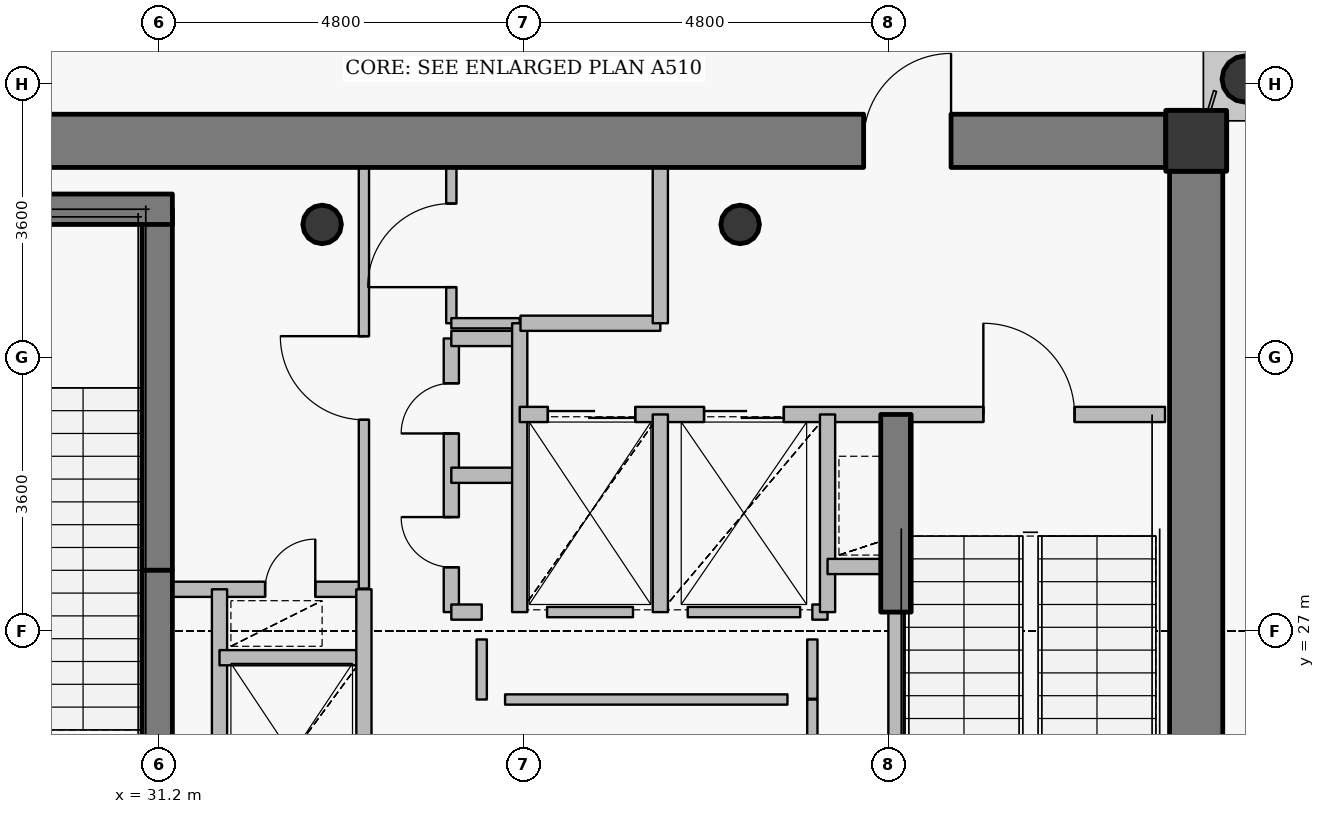
"""IFC4 building model, lengths in metres.
Left out: names, types, materials, properties, quantities, classifications, styles, units other than length and angle.
Written with IfcOpenShell. Run it as: python <this file> out.ifc"""

import sys

from ifc_helpers import new_model, si_unit, direction, frame, frame_2d, origin, origin_2d, place, context, subcontext, project, spatial, rectangle, hollow_circle, extrude, source, transform, mapped, element, fill, save


model = new_model("IFC4")
c1 = context("Model", 3, precision=1e-05, world=origin(), true_north=direction((0.0, 1.0)))
c2 = subcontext(c1, "Body", "Model", "MODEL_VIEW")
j1 = project(units=[si_unit("LENGTHUNIT", "METRE"), si_unit("PLANEANGLEUNIT", "RADIAN")], contexts=[c1])
p1 = place(None, origin())
s1 = spatial("IfcSite", under=j1, at=p1, CompositionType="ELEMENT")
p2 = place(p1, origin())
s2 = spatial("IfcBuilding", under=s1, at=p2, CompositionType="ELEMENT")
p3 = place(p2, frame((0.0, 0.0, 368.4)))
s3 = spatial("IfcBuildingStorey", under=s2, at=p3, CompositionType="ELEMENT", Elevation=368.4)
p4 = place(p3, frame((44.85, 33.45, 0.0), z_axis=(0.0, 0.0, 1.0), x_axis=(1.0, 0.0, 0.0)))
e1 = element("IfcColumn", 1, at=p4, inside=s3, PredefinedType="COLUMN", context=c2, shape_type="SweptSolid", body=[
    extrude(rectangle(XDim=0.8, YDim=0.8, at=origin_2d()), origin(), (0.0, 0.0, 1.0), 4.8),
])
for number, where, z_axis, x_axis in (
    (2, (38.85, 32.35, 0.0), (0.0, 0.0, 1.0), (1.0, 0.0, 0.0)),
    (3, (33.35, 32.35, 0.0), (0.0, 0.0, 1.0), (1.0, 0.0, 0.0)),
):
    element("IfcColumn", number, at=place(p3, frame(where, z_axis=z_axis, x_axis=x_axis)), inside=s3, PredefinedType="COLUMN", context=c2, shape_type="SweptSolid", body=[
        extrude(hollow_circle(Radius=0.254, WallThickness=0.02, at=origin_2d()), origin(), (0.0, 0.0, 1.0), 4.8),
    ])
p5 = place(p3, frame((31.18, 27.8, 0.0), z_axis=(0.0, 0.0, 1.0), x_axis=(0.0, 1.0, 0.0)))
e4 = element("IfcWall", 4, at=p5, inside=s3, PredefinedType="SHEAR", context=c2, shape_type="SweptSolid", body=[
    extrude(rectangle(XDim=4.75, YDim=0.4, at=frame_2d((2.375, 0.0))), origin(), (0.0, 0.0, 1.0), 4.8),
])
p6 = place(p3, frame((27.25, 32.55, 0.0), z_axis=(0.0, 0.0, 1.0), x_axis=(1.0, 0.0, 0.0)))
e5 = element("IfcWall", 5, at=p6, inside=s3, PredefinedType="SHEAR", context=c2, shape_type="SweptSolid", body=[
    extrude(rectangle(XDim=4.13, YDim=0.4, at=frame_2d((2.065, 0.0))), origin(), (0.0, 0.0, 1.0), 4.8),
])
p7 = place(p3, frame((27.55, 33.45, 0.0), z_axis=(0.0, 0.0, 1.0), x_axis=(1.0, 0.0, 0.0)))
e6 = element("IfcWall", 6, at=p7, inside=s3, PredefinedType="SHEAR", context=c2, shape_type="SweptSolid", body=[
    extrude(rectangle(XDim=16.9, YDim=0.7, at=frame_2d((8.45, 0.0))), origin(), (0.0, 0.0, 1.0), 4.05),
])
p8 = place(p7, frame((12.925, 0.0, 0.0)))
e7 = element("IfcOpeningElement", 7, at=p8, cuts=e6, PredefinedType="OPENING", context=c2, shape_type="SweptSolid", body=[
    extrude(rectangle(XDim=1.15, YDim=2.15, at=origin_2d()), frame((0.575, 0.36, 1.075), z_axis=(0.0, -1.0, 0.0), x_axis=(1.0, 0.0, 0.0)), (0.0, 0.0, 1.0), 0.72),
])
p9 = place(p3, frame((44.85, 33.05, 0.0), z_axis=(0.0, 0.0, 1.0), x_axis=(0.0, -1.0, 0.0)))
e8 = element("IfcWall", 8, at=p9, inside=s3, PredefinedType="SHEAR", context=c2, shape_type="SweptSolid", body=[
    extrude(rectangle(XDim=12.1, YDim=0.7, at=frame_2d((6.05, 0.0))), origin(), (0.0, 0.0, 1.0), 4.05),
])
p10 = place(p3, frame((31.18, 25.55, 0.0), z_axis=(0.0, 0.0, 1.0), x_axis=(0.0, 1.0, 0.0)))
e9 = element("IfcWall", 9, at=p10, inside=s3, PredefinedType="SHEAR", context=c2, shape_type="SweptSolid", body=[
    extrude(rectangle(XDim=2.25, YDim=0.4, at=frame_2d((1.125, 0.0))), origin(), (0.0, 0.0, 1.0), 4.1),
])
p11 = place(p3, frame((40.9, 27.25, 0.0), z_axis=(0.0, 0.0, 1.0), x_axis=(0.0, 1.0, 0.0)))
e10 = element("IfcWall", 10, at=p11, inside=s3, PredefinedType="SHEAR", context=c2, shape_type="SweptSolid", body=[
    extrude(rectangle(XDim=2.6, YDim=0.4, at=frame_2d((1.3, 0.0))), origin(), (0.0, 0.0, 1.0), 4.1),
])
p12 = place(p3, frame((45.495, 34.263, -0.3), z_axis=(0.0, 0.0, 1.0), x_axis=(1.0, 0.0, 0.0)))
e11 = element("IfcColumn", 11, at=p12, inside=s3, PredefinedType="COLUMN", context=c2, shape_type="SweptSolid", body=[
    extrude(hollow_circle(Radius=0.305, WallThickness=0.025, at=origin_2d()), origin(), (0.0, 0.0, 1.0), 4.8),
])
p13 = place(p3, frame((44.167, 35.791, 0.0), z_axis=(0.0, 0.0, 1.0), x_axis=(0.830407326996, -0.557156774411, 0.0)))
e12 = element("IfcWall", 12, at=p13, inside=s3, PredefinedType="SOLIDWALL", context=c2, shape_type="SweptSolid", body=[
    extrude(rectangle(XDim=1.993, YDim=0.28, at=frame_2d((0.997, 0.0))), origin(), (0.0, 0.0, 1.0), 4.5),
])
p14 = place(p3, frame((31.1, 27.55, 0.0), z_axis=(0.0, 0.0, 1.0), x_axis=(1.0, 0.0, 0.0)))
e13 = element("IfcWall", 13, at=p14, inside=s3, PredefinedType="PARTITIONING", context=c2, shape_type="SweptSolid", body=[
    extrude(rectangle(XDim=2.8, YDim=0.2, at=frame_2d((1.4, 0.0))), origin(), (0.0, 0.0, 1.0), 4.085),
])
p15 = place(p14, frame((1.5, 0.0, 0.0)))
e14 = element("IfcOpeningElement", 14, at=p15, cuts=e13, PredefinedType="OPENING", context=c2, shape_type="SweptSolid", body=[
    extrude(rectangle(XDim=0.66, YDim=2.05, at=origin_2d()), frame((0.33, 0.11, 1.025), z_axis=(0.0, -1.0, 0.0), x_axis=(1.0, 0.0, 0.0)), (0.0, 0.0, 1.0), 0.22),
])
p16 = place(p3, frame((32.0, 24.1, 0.0), z_axis=(0.0, 0.0, 1.0), x_axis=(0.0, 1.0, 0.0)))
e15 = element("IfcWall", 15, at=p16, inside=s3, PredefinedType="PARTITIONING", context=c2, shape_type="SweptSolid", body=[
    extrude(rectangle(XDim=3.45, YDim=0.2, at=frame_2d((1.725, 0.0))), origin(), (0.0, 0.0, 1.0), 4.5),
])
p17 = place(p3, frame((32.0, 26.65, 0.0), z_axis=(0.0, 0.0, 1.0), x_axis=(1.0, 0.0, 0.0)))
e16 = element("IfcWall", 16, at=p17, inside=s3, PredefinedType="PARTITIONING", context=c2, shape_type="SweptSolid", body=[
    extrude(rectangle(XDim=1.9, YDim=0.2, at=frame_2d((0.95, 0.0))), origin(), (0.0, 0.0, 1.0), 4.085),
])
p18 = place(p3, frame((33.9, 20.9, 0.0), z_axis=(0.0, 0.0, 1.0), x_axis=(0.0, 1.0, 0.0)))
e17 = element("IfcWall", 17, at=p18, inside=s3, PredefinedType="PARTITIONING", context=c2, shape_type="SweptSolid", body=[
    extrude(rectangle(XDim=6.65, YDim=0.2, at=frame_2d((3.325, 0.0))), origin(), (0.0, 0.0, 1.0), 4.085),
])
p19 = place(p3, frame((33.9, 27.56, 0.0), z_axis=(0.0, 0.0, 1.0), x_axis=(0.0, 1.0, 0.0)))
e18 = element("IfcWall", 18, at=p19, inside=s3, PredefinedType="PARTITIONING", context=c2, shape_type="SweptSolid", body=[
    extrude(rectangle(XDim=5.54, YDim=0.135, at=frame_2d((2.77, 0.0))), origin(), (0.0, 0.0, 1.0), 4.085),
])
p20 = place(p19, frame((2.22, 0.0, 0.0)))
e19 = element("IfcOpeningElement", 19, at=p20, cuts=e18, PredefinedType="OPENING", context=c2, shape_type="SweptSolid", body=[
    extrude(rectangle(XDim=1.1, YDim=2.15, at=origin_2d()), frame((0.55, 0.078, 1.075), z_axis=(0.0, -1.0, 0.0), x_axis=(1.0, 0.0, 0.0)), (0.0, 0.0, 1.0), 0.155),
])
p21 = place(p3, frame((35.05, 27.25, 0.0), z_axis=(0.0, 0.0, 1.0), x_axis=(0.0, 1.0, 0.0)))
e20 = element("IfcWall", 20, at=p21, inside=s3, PredefinedType="PARTITIONING", context=c2, shape_type="SweptSolid", body=[
    extrude(rectangle(XDim=3.6, YDim=0.2, at=frame_2d((1.8, 0.0))), origin(), (0.0, 0.0, 1.0), 4.5),
])
p22 = place(p21, frame((0.59, 0.0, 0.0)))
e21 = element("IfcOpeningElement", 21, at=p22, cuts=e20, PredefinedType="OPENING", context=c2, shape_type="SweptSolid", body=[
    extrude(rectangle(XDim=0.66, YDim=2.05, at=origin_2d()), frame((0.33, 0.11, 1.025), z_axis=(0.0, -1.0, 0.0), x_axis=(1.0, 0.0, 0.0)), (0.0, 0.0, 1.0), 0.22),
])
p23 = place(p21, frame((2.35, 0.0, 0.0)))
e22 = element("IfcOpeningElement", 22, at=p23, cuts=e20, PredefinedType="OPENING", context=c2, shape_type="SweptSolid", body=[
    extrude(rectangle(XDim=0.66, YDim=2.05, at=origin_2d()), frame((0.33, 0.11, 1.025), z_axis=(0.0, -1.0, 0.0), x_axis=(1.0, 0.0, 0.0)), (0.0, 0.0, 1.0), 0.22),
])
p24 = place(p3, frame((35.05, 27.25, 0.0), z_axis=(0.0, 0.0, 1.0), x_axis=(1.0, 0.0, 0.0)))
e23 = element("IfcWall", 23, at=p24, inside=s3, PredefinedType="PARTITIONING", context=c2, shape_type="SweptSolid", body=[
    extrude(rectangle(XDim=0.4, YDim=0.2, at=frame_2d((0.2, 0.0))), origin(), (0.0, 0.0, 1.0), 4.5),
])
for number, where, z_axis, x_axis in (
    (24, (35.05, 29.05, 0.0), (0.0, 0.0, 1.0), (1.0, 0.0, 0.0)),
    (25, (35.05, 30.85, 0.0), (0.0, 0.0, 1.0), (1.0, 0.0, 0.0)),
):
    element("IfcWall", number, at=place(p3, frame(where, z_axis=z_axis, x_axis=x_axis)), inside=s3, PredefinedType="PARTITIONING", context=c2, shape_type="SweptSolid", body=[
        extrude(rectangle(XDim=0.9, YDim=0.2, at=frame_2d((0.45, 0.0))), origin(), (0.0, 0.0, 1.0), 4.5),
    ])
p25 = place(p3, frame((35.05, 31.05, 0.0), z_axis=(0.0, 0.0, 1.0), x_axis=(0.0, 1.0, 0.0)))
e26 = element("IfcWall", 26, at=p25, inside=s3, PredefinedType="PARTITIONING", context=c2, shape_type="SweptSolid", body=[
    extrude(rectangle(XDim=2.05, YDim=0.135, at=frame_2d((1.025, 0.0))), origin(), (0.0, 0.0, 1.0), 4.085),
])
p26 = place(p25, frame((0.475, 0.0, 0.0)))
e27 = element("IfcOpeningElement", 27, at=p26, cuts=e26, PredefinedType="OPENING", context=c2, shape_type="SweptSolid", body=[
    extrude(rectangle(XDim=1.1, YDim=2.15, at=origin_2d()), frame((0.55, 0.078, 1.075), z_axis=(0.0, -1.0, 0.0), x_axis=(1.0, 0.0, 0.0)), (0.0, 0.0, 1.0), 0.155),
])
p27 = place(p3, frame((35.05, 31.05, 0.0), z_axis=(0.0, 0.0, 1.0), x_axis=(1.0, 0.0, 0.0)))
e28 = element("IfcWall", 28, at=p27, inside=s3, PredefinedType="PARTITIONING", context=c2, shape_type="SweptSolid", body=[
    extrude(rectangle(XDim=0.9, YDim=0.135, at=frame_2d((0.45, 0.0))), origin(), (0.0, 0.0, 1.0), 4.5),
])
p28 = place(p3, frame((35.95, 27.25, 0.0), z_axis=(0.0, 0.0, 1.0), x_axis=(0.0, 1.0, 0.0)))
e29 = element("IfcWall", 29, at=p28, inside=s3, PredefinedType="PARTITIONING", context=c2, shape_type="SweptSolid", body=[
    extrude(rectangle(XDim=3.8, YDim=0.2, at=frame_2d((1.9, 0.0))), origin(), (0.0, 0.0, 1.0), 4.5),
])
p29 = place(p3, frame((35.95, 29.85, 0.0), z_axis=(0.0, 0.0, 1.0), x_axis=(1.0, 0.0, 0.0)))
e30 = element("IfcWall", 30, at=p29, inside=s3, PredefinedType="PARTITIONING", context=c2, shape_type="SweptSolid", body=[
    extrude(rectangle(XDim=8.49, YDim=0.2, at=frame_2d((4.245, 0.0))), origin(), (0.0, 0.0, 1.0), 4.085),
])
p30 = place(p29, frame((6.1, 0.0, 0.0)))
e31 = element("IfcOpeningElement", 31, at=p30, cuts=e30, PredefinedType="OPENING", context=c2, shape_type="SweptSolid", body=[
    extrude(rectangle(XDim=1.2, YDim=2.15, at=origin_2d()), frame((0.6, 0.11, 1.075), z_axis=(0.0, -1.0, 0.0), x_axis=(1.0, 0.0, 0.0)), (0.0, 0.0, 1.0), 0.22),
])
p31 = place(p29, frame((0.37, 0.0, 0.0)))
e32 = element("IfcOpeningElement", 32, at=p31, cuts=e30, PredefinedType="OPENING", context=c2, shape_type="SweptSolid", body=[
    extrude(rectangle(XDim=1.15, YDim=2.15, at=origin_2d()), frame((0.575, 0.11, 1.075), z_axis=(0.0, -1.0, 0.0), x_axis=(1.0, 0.0, 0.0)), (0.0, 0.0, 1.0), 0.22),
])
p32 = place(p29, frame((2.425, 0.0, 0.0)))
e33 = element("IfcOpeningElement", 33, at=p32, cuts=e30, PredefinedType="OPENING", context=c2, shape_type="SweptSolid", body=[
    extrude(rectangle(XDim=1.05, YDim=2.15, at=origin_2d()), frame((0.525, 0.11, 1.075), z_axis=(0.0, -1.0, 0.0), x_axis=(1.0, 0.0, 0.0)), (0.0, 0.0, 1.0), 0.22),
])
p33 = place(p3, frame((35.96, 31.05, 0.0), z_axis=(0.0, 0.0, 1.0), x_axis=(1.0, 0.0, 0.0)))
e34 = element("IfcWall", 34, at=p33, inside=s3, PredefinedType="PARTITIONING", context=c2, shape_type="SweptSolid", body=[
    extrude(rectangle(XDim=1.84, YDim=0.2, at=frame_2d((0.92, 0.0))), origin(), (0.0, 0.0, 1.0), 4.5),
])
p34 = place(p3, frame((37.8, 27.25, 0.0), z_axis=(0.0, 0.0, 1.0), x_axis=(0.0, 1.0, 0.0)))
e35 = element("IfcWall", 35, at=p34, inside=s3, PredefinedType="PARTITIONING", context=c2, shape_type="SweptSolid", body=[
    extrude(rectangle(XDim=2.6, YDim=0.2, at=frame_2d((1.3, 0.0))), origin(), (0.0, 0.0, 1.0), 4.5),
])
p35 = place(p3, frame((37.8, 31.05, 0.0), z_axis=(0.0, 0.0, 1.0), x_axis=(0.0, 1.0, 0.0)))
e36 = element("IfcWall", 36, at=p35, inside=s3, PredefinedType="PARTITIONING", context=c2, shape_type="SweptSolid", body=[
    extrude(rectangle(XDim=2.05, YDim=0.2, at=frame_2d((1.025, 0.0))), origin(), (0.0, 0.0, 1.0), 4.085),
])
p36 = place(p3, frame((39.8, 23.7, 0.0), z_axis=(0.0, 0.0, 1.0), x_axis=(0.0, 1.0, 0.0)))
e37 = element("IfcWall", 37, at=p36, inside=s3, PredefinedType="PARTITIONING", context=c2, shape_type="SweptSolid", body=[
    extrude(rectangle(XDim=2.4, YDim=0.135, at=frame_2d((1.2, 0.0))), origin(), (0.0, 0.0, 1.0), 4.5),
])
p37 = place(p36, frame((0.79, 0.0, 0.0)))
e38 = element("IfcOpeningElement", 38, at=p37, cuts=e37, PredefinedType="OPENING", context=c2, shape_type="SweptSolid", body=[
    extrude(rectangle(XDim=0.82, YDim=2.1, at=origin_2d()), frame((0.41, 0.078, 1.05), z_axis=(0.0, -1.0, 0.0), x_axis=(1.0, 0.0, 0.0)), (0.0, 0.0, 1.0), 0.155),
])
p38 = place(p3, frame((39.8, 27.25, 0.0), z_axis=(0.0, 0.0, 1.0), x_axis=(1.0, 0.0, 0.0)))
e39 = element("IfcWall", 39, at=p38, inside=s3, PredefinedType="PARTITIONING", context=c2, shape_type="SweptSolid", body=[
    extrude(rectangle(XDim=0.2, YDim=0.2, at=frame_2d((0.1, 0.0))), origin(), (0.0, 0.0, 1.0), 4.5),
])
p39 = place(p3, frame((40.0, 27.25, 0.0), z_axis=(0.0, 0.0, 1.0), x_axis=(0.0, 1.0, 0.0)))
e40 = element("IfcWall", 40, at=p39, inside=s3, PredefinedType="PARTITIONING", context=c2, shape_type="SweptSolid", body=[
    extrude(rectangle(XDim=2.6, YDim=0.2, at=frame_2d((1.3, 0.0))), origin(), (0.0, 0.0, 1.0), 4.5),
])
p40 = place(p3, frame((40.0, 27.85, 0.0), z_axis=(0.0, 0.0, 1.0), x_axis=(1.0, 0.0, 0.0)))
e41 = element("IfcWall", 41, at=p40, inside=s3, PredefinedType="PARTITIONING", context=c2, shape_type="SweptSolid", body=[
    extrude(rectangle(XDim=0.9, YDim=0.2, at=frame_2d((0.45, 0.0))), origin(), (0.0, 0.0, 1.0), 4.5),
])
p41 = place(p3, frame((40.9, 21.33, 0.0), z_axis=(0.0, 0.0, 1.0), x_axis=(0.0, 1.0, 0.0)))
e42 = element("IfcWall", 42, at=p41, inside=s3, PredefinedType="PARTITIONING", context=c2, shape_type="SweptSolid", body=[
    extrude(rectangle(XDim=5.91, YDim=0.2, at=frame_2d((2.955, 0.0))), origin(), (0.0, 0.0, 1.0), 4.035),
])
p42 = place(p3, frame((37.44, 27.25, 0.0), z_axis=(0.0, 0.0, 1.0), x_axis=(-1.0, 0.0, 0.0)))
e43 = element("IfcWall", 43, at=p42, inside=s3, PredefinedType="PARTITIONING", context=c2, shape_type="SweptSolid", body=[
    extrude(rectangle(XDim=1.13, YDim=0.135, at=frame_2d((0.565, 0.0))), origin(), (0.0, 0.0, 1.0), 4.5),
])
p43 = place(p3, frame((39.64, 27.25, 0.0), z_axis=(0.0, 0.0, 1.0), x_axis=(-1.0, 0.0, 0.0)))
e44 = element("IfcWall", 44, at=p43, inside=s3, PredefinedType="PARTITIONING", context=c2, shape_type="SweptSolid", body=[
    extrude(rectangle(XDim=1.48, YDim=0.135, at=frame_2d((0.74, 0.0))), origin(), (0.0, 0.0, 1.0), 4.085),
])
p44 = place(p3, frame((39.8, 26.11, 0.0), z_axis=(0.0, 0.0, 1.0), x_axis=(0.0, 1.0, 0.0)))
e45 = element("IfcWall", 45, at=p44, inside=s3, PredefinedType="PARTITIONING", context=c2, shape_type="SweptSolid", body=[
    extrude(rectangle(XDim=0.78, YDim=0.135, at=frame_2d((0.39, 0.0))), origin(), (0.0, 0.0, 1.0), 4.5),
])
p45 = place(p3, frame((35.45, 26.89, 0.0), z_axis=(0.0, 0.0, 1.0), x_axis=(0.0, -1.0, 0.0)))
e46 = element("IfcWall", 46, at=p45, inside=s3, PredefinedType="PARTITIONING", context=c2, shape_type="SweptSolid", body=[
    extrude(rectangle(XDim=0.79, YDim=0.135, at=frame_2d((0.395, 0.0))), origin(), (0.0, 0.0, 1.0), 4.5),
])
p46 = place(p3, frame((35.758, 26.1, 0.0), z_axis=(0.0, 0.0, 1.0), x_axis=(1.0, 0.0, 0.0)))
e47 = element("IfcWall", 47, at=p46, inside=s3, PredefinedType="PARTITIONING", context=c2, shape_type="SweptSolid", body=[
    extrude(rectangle(XDim=3.715, YDim=0.135, at=frame_2d((1.857, 0.0))), origin(), (0.0, 0.0, 1.0), 4.085),
])
p47 = place(p3, frame((45.2, 33.06, 0.0), z_axis=(0.0, 0.0, 1.0), x_axis=(0.0, 1.0, 0.0)))
e48 = element("IfcWall", 48, at=p47, inside=s3, PredefinedType="PARTITIONING", context=c2, shape_type="SweptSolid", body=[
    extrude(rectangle(XDim=0.74, YDim=0.135, at=frame_2d((0.37, 0.0))), origin(), (0.0, 0.0, 1.0), 4.035),
])
p48 = place(p3, frame((44.893, 33.8, 0.0), z_axis=(0.0, 0.0, 1.0), x_axis=(-1.0, 0.0, 0.0)))
e49 = element("IfcWall", 49, at=p48, inside=s3, PredefinedType="PARTITIONING", context=c2, shape_type="SweptSolid", body=[
    extrude(rectangle(XDim=0.433, YDim=0.135, at=frame_2d((0.216, 0.0))), origin(), (0.0, 0.0, 1.0), 3.985),
])
m1 = source(origin(), c2, "Body", "SweptSolid", [
    extrude(rectangle(XDim=1.15, YDim=2.15, at=origin_2d()), frame((0.575, 0.025, 1.075), z_axis=(0.0, -1.0, 0.0), x_axis=(1.0, 0.0, 0.0)), (0.0, 0.0, 1.0), 0.05),
])
p49 = place(p8, origin())
e50 = element("IfcDoor", 50, at=p49, inside=s3, OperationType="SINGLE_SWING_RIGHT", PredefinedType="DOOR", context=c2, shape_type="MappedRepresentation", body=[
    mapped(m1, transform((0.0, 0.0, 0.0), x_axis=(1.0, 0.0, 0.0), y_axis=(0.0, 1.0, 0.0), z_axis=(0.0, 0.0, 1.0), scale=1.0)),
])
fill(e7, e50)
m2 = source(origin(), c2, "Body", "SweptSolid", [
    extrude(rectangle(XDim=1.2, YDim=2.15, at=origin_2d()), frame((0.6, 0.025, 1.075), z_axis=(0.0, -1.0, 0.0), x_axis=(1.0, 0.0, 0.0)), (0.0, 0.0, 1.0), 0.05),
])
p50 = place(p30, origin())
e51 = element("IfcDoor", 51, at=p50, inside=s3, OperationType="SINGLE_SWING_LEFT", PredefinedType="DOOR", context=c2, shape_type="MappedRepresentation", body=[
    mapped(m2, transform((0.0, 0.0, 0.0), x_axis=(1.0, 0.0, 0.0), y_axis=(0.0, 1.0, 0.0), z_axis=(0.0, 0.0, 1.0), scale=1.0)),
])
fill(e31, e51)
m3 = source(origin(), c2, "Body", "SweptSolid", [
    extrude(rectangle(XDim=1.15, YDim=2.15, at=origin_2d()), frame((0.575, 0.025, 1.075), z_axis=(0.0, -1.0, 0.0), x_axis=(1.0, 0.0, 0.0)), (0.0, 0.0, 1.0), 0.05),
])
p51 = place(p31, origin())
e52 = element("IfcDoor", 52, at=p51, inside=s3, OperationType="DOUBLE_DOOR_SLIDING", PredefinedType="USERDEFINED", context=c2, shape_type="MappedRepresentation", body=[
    mapped(m3, transform((0.0, 0.0, 0.0), x_axis=(1.0, 0.0, 0.0), y_axis=(0.0, 1.0, 0.0), z_axis=(0.0, 0.0, 1.0), scale=1.0)),
])
fill(e32, e52)
m4 = source(origin(), c2, "Body", "SweptSolid", [
    extrude(rectangle(XDim=1.05, YDim=2.15, at=origin_2d()), frame((0.525, 0.025, 1.075), z_axis=(0.0, -1.0, 0.0), x_axis=(1.0, 0.0, 0.0)), (0.0, 0.0, 1.0), 0.05),
])
p52 = place(p32, origin())
e53 = element("IfcDoor", 53, at=p52, inside=s3, OperationType="DOUBLE_DOOR_SLIDING", PredefinedType="USERDEFINED", context=c2, shape_type="MappedRepresentation", body=[
    mapped(m4, transform((0.0, 0.0, 0.0), x_axis=(1.0, 0.0, 0.0), y_axis=(0.0, 1.0, 0.0), z_axis=(0.0, 0.0, 1.0), scale=1.0)),
])
fill(e33, e53)
m5 = source(origin(), c2, "Body", "SweptSolid", [
    extrude(rectangle(XDim=0.66, YDim=2.05, at=origin_2d()), frame((0.33, 0.025, 1.025), z_axis=(0.0, -1.0, 0.0), x_axis=(1.0, 0.0, 0.0)), (0.0, 0.0, 1.0), 0.05),
])
p53 = place(p22, origin())
e54 = element("IfcDoor", 54, at=p53, inside=s3, OperationType="SINGLE_SWING_RIGHT", PredefinedType="USERDEFINED", context=c2, shape_type="MappedRepresentation", body=[
    mapped(m5, transform((0.0, 0.0, 0.0), x_axis=(1.0, 0.0, 0.0), y_axis=(0.0, 1.0, 0.0), z_axis=(0.0, 0.0, 1.0), scale=1.0)),
])
fill(e21, e54)
p54 = place(p23, origin())
e55 = element("IfcDoor", 55, at=p54, inside=s3, OperationType="SINGLE_SWING_LEFT", PredefinedType="USERDEFINED", context=c2, shape_type="MappedRepresentation", body=[
    mapped(m5, transform((0.0, 0.0, 0.0), x_axis=(1.0, 0.0, 0.0), y_axis=(0.0, 1.0, 0.0), z_axis=(0.0, 0.0, 1.0), scale=1.0)),
])
fill(e22, e55)
m6 = source(origin(), c2, "Body", "SweptSolid", [
    extrude(rectangle(XDim=1.1, YDim=2.15, at=origin_2d()), frame((0.55, 0.025, 1.075), z_axis=(0.0, -1.0, 0.0), x_axis=(1.0, 0.0, 0.0)), (0.0, 0.0, 1.0), 0.05),
])
p55 = place(p20, origin())
e56 = element("IfcDoor", 56, at=p55, inside=s3, OperationType="SINGLE_SWING_RIGHT", PredefinedType="DOOR", context=c2, shape_type="MappedRepresentation", body=[
    mapped(m6, transform((0.0, 0.0, 0.0), x_axis=(1.0, 0.0, 0.0), y_axis=(0.0, 1.0, 0.0), z_axis=(0.0, 0.0, 1.0), scale=1.0)),
])
fill(e19, e56)
p56 = place(p26, origin())
e57 = element("IfcDoor", 57, at=p56, inside=s3, OperationType="SINGLE_SWING_LEFT", PredefinedType="DOOR", context=c2, shape_type="MappedRepresentation", body=[
    mapped(m6, transform((0.0, 0.0, 0.0), x_axis=(1.0, 0.0, 0.0), y_axis=(0.0, 1.0, 0.0), z_axis=(0.0, 0.0, 1.0), scale=1.0)),
])
fill(e27, e57)
p57 = place(p15, origin())
e58 = element("IfcDoor", 58, at=p57, inside=s3, OperationType="SINGLE_SWING_RIGHT", PredefinedType="USERDEFINED", context=c2, shape_type="MappedRepresentation", body=[
    mapped(m5, transform((0.0, 0.0, 0.0), x_axis=(1.0, 0.0, 0.0), y_axis=(0.0, 1.0, 0.0), z_axis=(0.0, 0.0, 1.0), scale=1.0)),
])
fill(e14, e58)
save(model, sys.argv[1])
